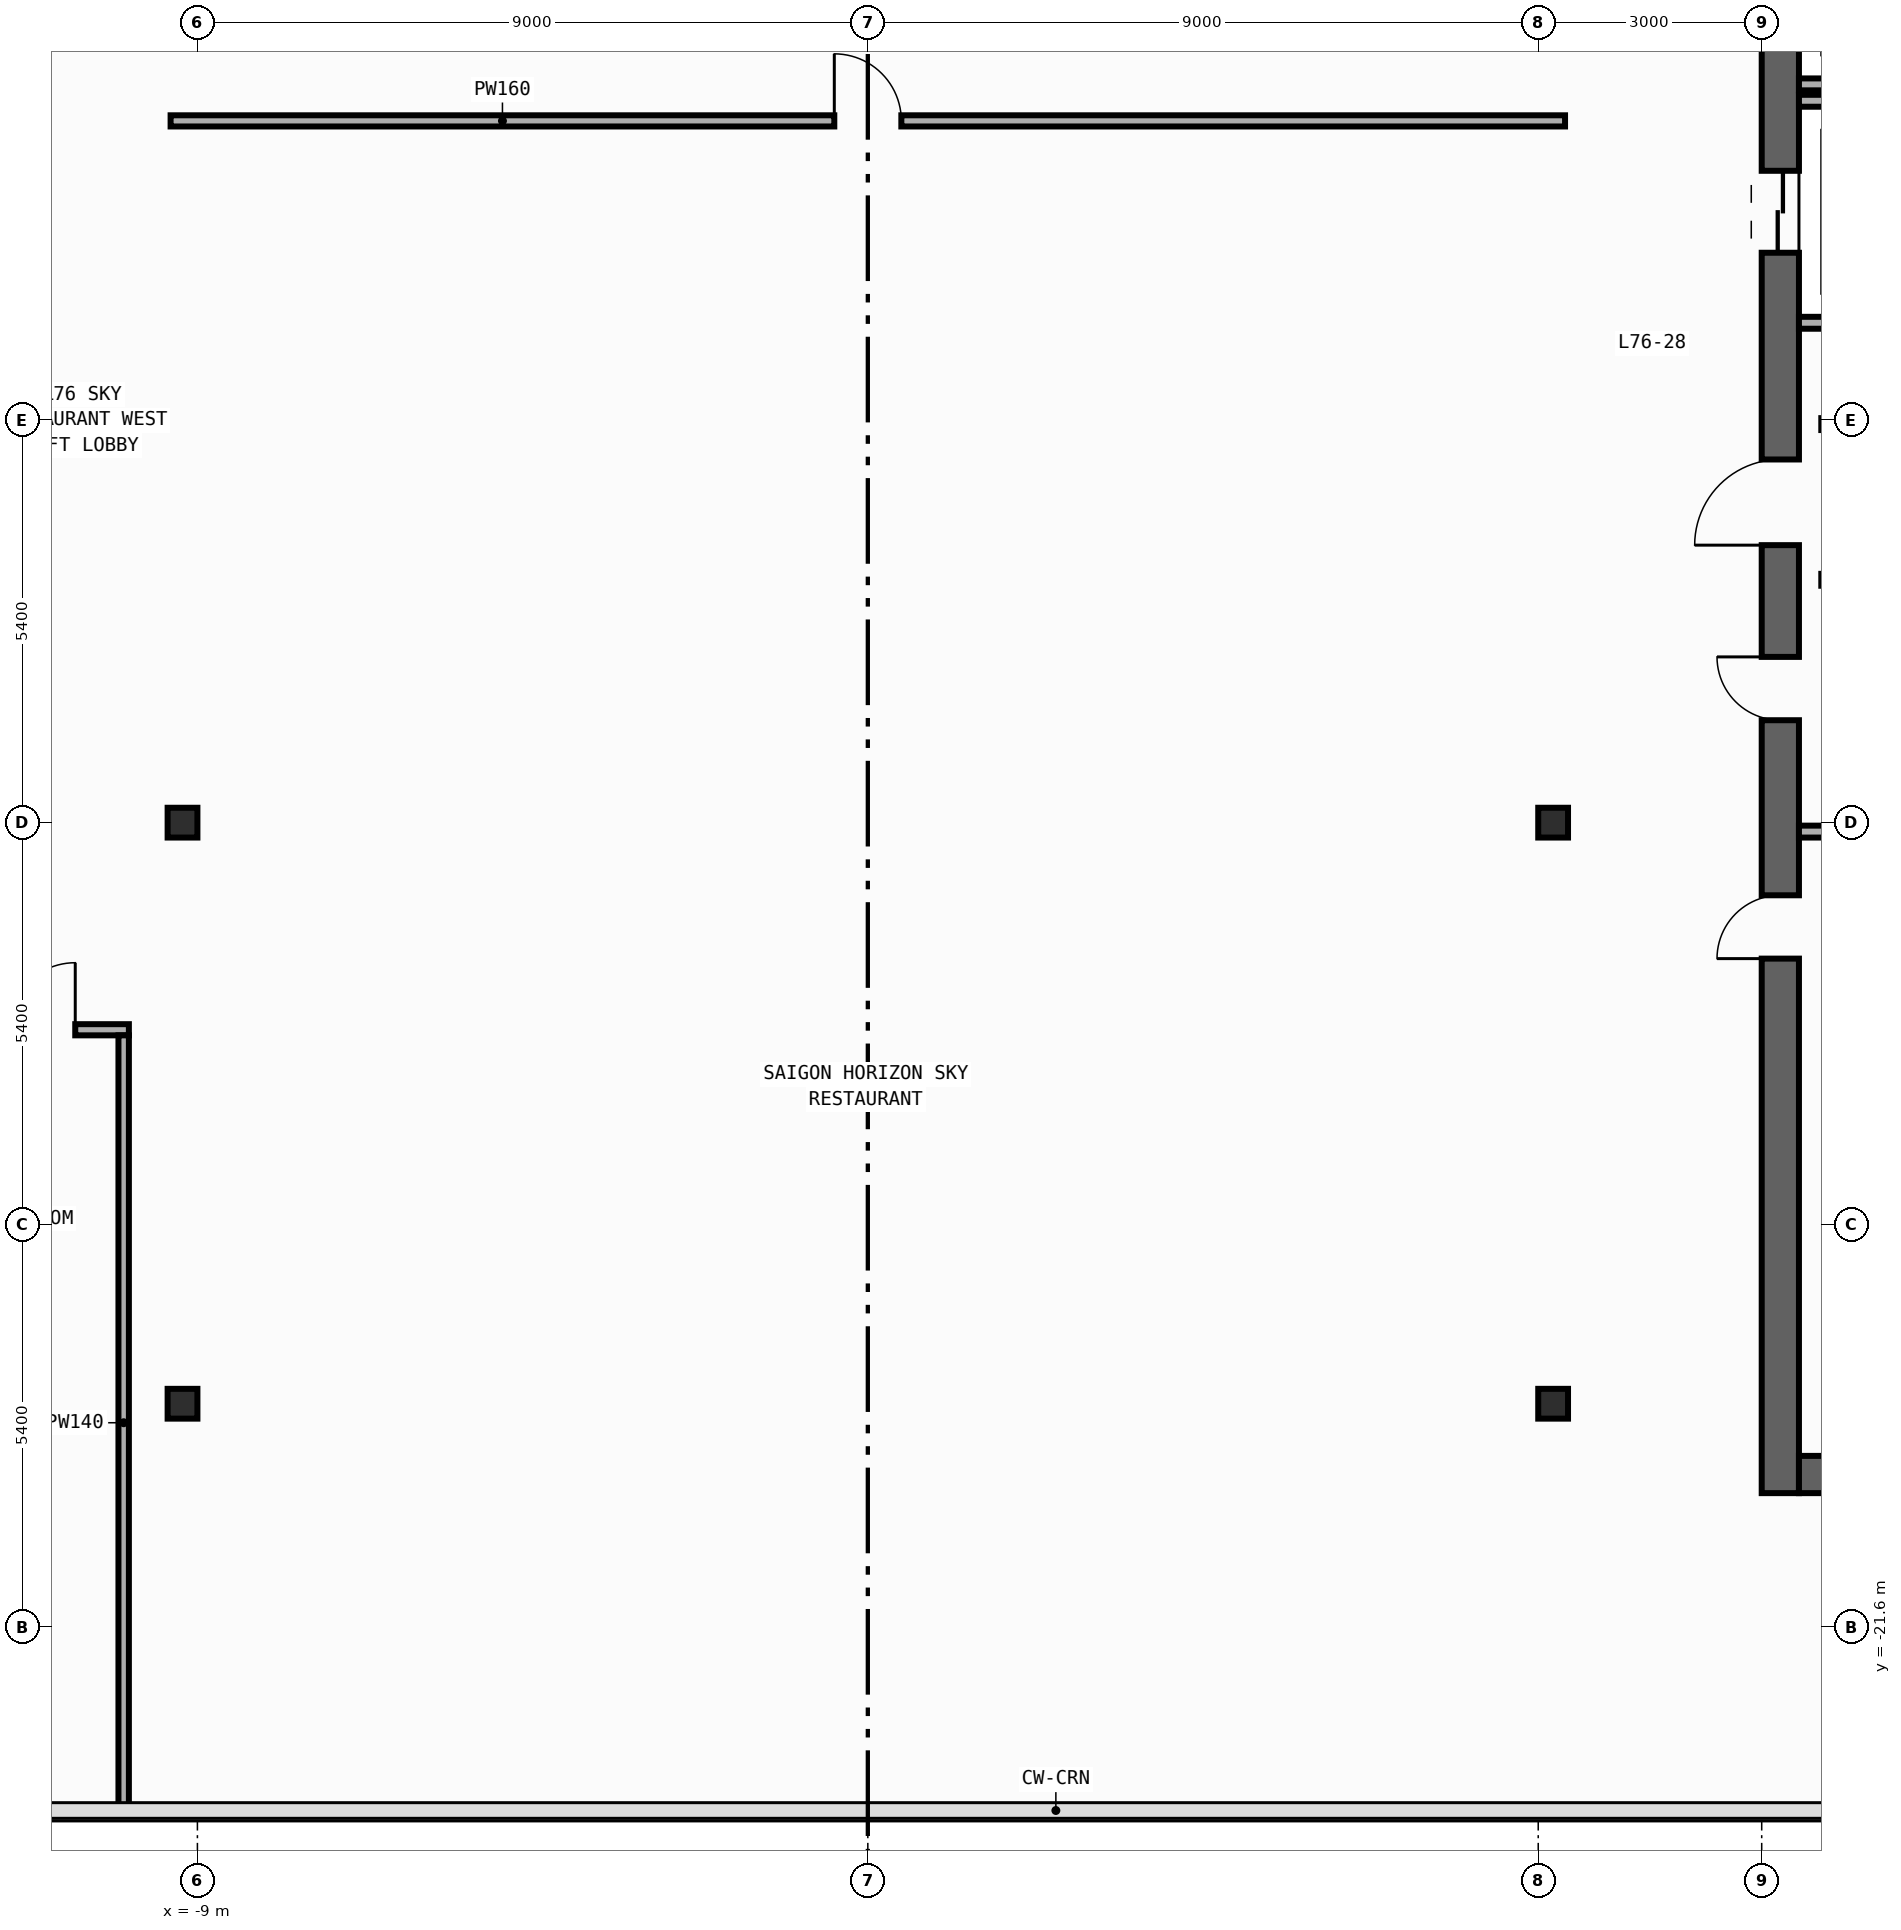
"""IFC4 building model, lengths in metres.
Left out: names, types, materials, properties, quantities, classifications, styles, units other than length and angle.
Written with IfcOpenShell. Run it as: python <this file> out.ifc"""

import sys

from ifc_helpers import new_model, si_unit, direction, frame, frame_2d, origin, origin_2d, place, context, subcontext, project, spatial, rectangle, i_section, extrude, element, fill, save


model = new_model("IFC4")
c1 = context("Model", 3, precision=1e-05, world=origin(), true_north=direction((0.0, 1.0)))
c2 = subcontext(c1, "Body", "Model", "MODEL_VIEW")
j1 = project(units=[si_unit("LENGTHUNIT", "METRE"), si_unit("PLANEANGLEUNIT", "RADIAN")], contexts=[c1])
p1 = place(None, origin())
s1 = spatial("IfcSite", under=j1, at=p1, CompositionType="ELEMENT")
p2 = place(p1, origin())
s2 = spatial("IfcBuilding", under=s1, at=p2, CompositionType="ELEMENT")
p3 = place(p2, frame((0.0, 0.0, 315.6)))
s3 = spatial("IfcBuildingStorey", under=s2, at=p3, CompositionType="ELEMENT", Elevation=315.6)
p4 = place(p3, frame((12.25, -19.8, 0.0), z_axis=(0.0, 0.0, 1.0), x_axis=(0.0, 1.0, 0.0)))
e1 = element("IfcWall", 1, at=p4, inside=s3, PredefinedType="SHEAR", context=c2, shape_type="SweptSolid", body=[
    extrude(rectangle(XDim=27.0, YDim=0.5, at=frame_2d((13.5, 0.0))), origin(), (0.0, 0.0, 1.0), 4.54),
])
p5 = place(p4, frame((23.05, 0.0, 0.0)))
e2 = element("IfcOpeningElement", 2, at=p5, cuts=e1, PredefinedType="OPENING", context=c2, shape_type="SweptSolid", body=[
    extrude(rectangle(XDim=1.1, YDim=2.2, at=frame_2d((0.55, 1.1))), frame((0.0, 0.26, 0.0), z_axis=(0.0, -1.0, 0.0), x_axis=(1.0, 0.0, 0.0)), (0.0, 0.0, 1.0), 0.52),
])
p6 = place(p4, frame((19.85, 0.0, 0.0)))
e3 = element("IfcOpeningElement", 3, at=p6, cuts=e1, PredefinedType="OPENING", context=c2, shape_type="SweptSolid", body=[
    extrude(rectangle(XDim=1.1, YDim=2.2, at=frame_2d((0.55, 1.1))), frame((0.0, 0.26, 0.0), z_axis=(0.0, -1.0, 0.0), x_axis=(1.0, 0.0, 0.0)), (0.0, 0.0, 1.0), 0.52),
])
p7 = place(p4, frame((16.65, 0.0, 0.0)))
e4 = element("IfcOpeningElement", 4, at=p7, cuts=e1, PredefinedType="OPENING", context=c2, shape_type="SweptSolid", body=[
    extrude(rectangle(XDim=1.1, YDim=2.2, at=frame_2d((0.55, 1.1))), frame((0.0, 0.26, 0.0), z_axis=(0.0, -1.0, 0.0), x_axis=(1.0, 0.0, 0.0)), (0.0, 0.0, 1.0), 0.52),
])
p8 = place(p4, frame((7.175, 0.0, 0.0)))
e5 = element("IfcOpeningElement", 5, at=p8, cuts=e1, PredefinedType="OPENING", context=c2, shape_type="SweptSolid", body=[
    extrude(rectangle(XDim=0.85, YDim=2.1, at=frame_2d((0.425, 1.05))), frame((0.0, 0.26, 0.0), z_axis=(0.0, -1.0, 0.0), x_axis=(1.0, 0.0, 0.0)), (0.0, 0.0, 1.0), 0.52),
])
p9 = place(p4, frame((10.375, 0.0, 0.0)))
e6 = element("IfcOpeningElement", 6, at=p9, cuts=e1, PredefinedType="OPENING", context=c2, shape_type="SweptSolid", body=[
    extrude(rectangle(XDim=0.85, YDim=2.1, at=frame_2d((0.425, 1.05))), frame((0.0, 0.26, 0.0), z_axis=(0.0, -1.0, 0.0), x_axis=(1.0, 0.0, 0.0)), (0.0, 0.0, 1.0), 0.52),
])
p10 = place(p4, frame((12.725, 0.0, 0.0)))
e7 = element("IfcOpeningElement", 7, at=p10, cuts=e1, PredefinedType="OPENING", context=c2, shape_type="SweptSolid", body=[
    extrude(rectangle(XDim=1.15, YDim=2.2, at=frame_2d((0.575, 1.1))), frame((0.0, 0.26, 0.0), z_axis=(0.0, -1.0, 0.0), x_axis=(1.0, 0.0, 0.0)), (0.0, 0.0, 1.0), 0.52),
])
p11 = place(p4, frame((25.125, 0.0, 0.0)))
e8 = element("IfcOpeningElement", 8, at=p11, cuts=e1, PredefinedType="OPENING", context=c2, shape_type="SweptSolid", body=[
    extrude(rectangle(XDim=0.85, YDim=2.1, at=frame_2d((0.425, 1.05))), frame((0.0, 0.26, 0.0), z_axis=(0.0, -1.0, 0.0), x_axis=(1.0, 0.0, 0.0)), (0.0, 0.0, 1.0), 0.52),
])
p12 = place(p3, frame((12.5, -19.55, 0.0), z_axis=(0.0, 0.0, 1.0), x_axis=(1.0, 0.0, 0.0)))
e9 = element("IfcWall", 9, at=p12, inside=s3, PredefinedType="SHEAR", context=c2, shape_type="SweptSolid", body=[
    extrude(rectangle(XDim=7.4, YDim=0.5, at=frame_2d((3.7, 0.0))), origin(), (0.0, 0.0, 1.0), 4.54),
])
for number, where, z_axis, x_axis in (
    (10, (-9.2, -18.6, 0.0), (0.0, 0.0, 1.0), (1.0, 0.0, 0.0)),
    (11, (-9.2, -10.8, 0.0), (0.0, 0.0, 1.0), (1.0, 0.0, 0.0)),
    (12, (9.2, -18.6, 0.0), (0.0, 0.0, 1.0), (1.0, 0.0, 0.0)),
    (13, (9.2, -10.8, 0.0), (0.0, 0.0, 1.0), (1.0, 0.0, 0.0)),
):
    element("IfcColumn", number, at=place(p3, frame(where, z_axis=z_axis, x_axis=x_axis)), inside=s3, PredefinedType="COLUMN", context=c2, shape_type="SweptSolid", body=[
        extrude(i_section(OverallWidth=0.4, OverallDepth=0.4, WebThickness=0.013, FlangeThickness=0.021, FilletRadius=0.022, at=origin_2d()), origin(), (0.0, 0.0, 1.0), 4.8),
    ])
for number, where, z_axis, x_axis in (
    (14, (12.5, -0.89, 0.0), (0.0, 0.0, 1.0), (1.0, 0.0, 0.0)),
    (15, (12.5, -4.09, 0.0), (0.0, 0.0, 1.0), (1.0, 0.0, 0.0)),
    (16, (12.5, -1.11, 0.0), (0.0, 0.0, 1.0), (1.0, 0.0, 0.0)),
):
    element("IfcWall", number, at=place(p3, frame(where, z_axis=z_axis, x_axis=x_axis)), inside=s3, PredefinedType="STANDARD", context=c2, shape_type="SweptSolid", body=[
        extrude(rectangle(XDim=2.49, YDim=0.16, at=frame_2d((1.245, 0.0))), origin(), (0.0, 0.0, 1.0), 4.54),
    ])
for number, where, z_axis, x_axis in (
    (17, (12.8, -5.45, 0.0), (0.0, 0.0, 1.0), (1.0, 0.0, 0.0)),
    (18, (12.8, -7.54, 0.0), (0.0, 0.0, 1.0), (1.0, 0.0, 0.0)),
):
    element("IfcWall", number, at=place(p3, frame(where, z_axis=z_axis, x_axis=x_axis)), inside=s3, PredefinedType="STANDARD", context=c2, shape_type="SweptSolid", body=[
        extrude(rectangle(XDim=2.6, YDim=0.16, at=frame_2d((1.3, 0.0))), origin(), (0.0, 0.0, 1.0), 4.54),
    ])
p13 = place(p3, frame((12.5, -10.92, 0.0), z_axis=(0.0, 0.0, 1.0), x_axis=(1.0, 0.0, 0.0)))
e19 = element("IfcWall", 19, at=p13, inside=s3, PredefinedType="PARTITIONING", context=c2, shape_type="SweptSolid", body=[
    extrude(rectangle(XDim=2.9, YDim=0.16, at=frame_2d((1.45, 0.0))), origin(), (0.0, 0.0, 1.0), 3.64),
])
p14 = place(p3, frame((-12.0, -13.58, 0.0), z_axis=(0.0, 0.0, 1.0), x_axis=(1.0, 0.0, 0.0)))
e20 = element("IfcWall", 20, at=p14, inside=s3, PredefinedType="PARTITIONING", context=c2, shape_type="SweptSolid", body=[
    extrude(rectangle(XDim=2.08, YDim=0.15, at=frame_2d((1.04, 0.0))), origin(), (0.0, 0.0, 1.0), 4.54),
])
p15 = place(p14, frame((0.46, 0.0, 0.0)))
e21 = element("IfcOpeningElement", 21, at=p15, cuts=e20, PredefinedType="OPENING", context=c2, shape_type="SweptSolid", body=[
    extrude(rectangle(XDim=0.9, YDim=2.15, at=frame_2d((0.45, 1.075))), frame((0.0, 0.085, 0.0), z_axis=(0.0, -1.0, 0.0), x_axis=(1.0, 0.0, 0.0)), (0.0, 0.0, 1.0), 0.17),
])
p16 = place(p3, frame((-9.36, -1.38, 0.0), z_axis=(0.0, 0.0, 1.0), x_axis=(1.0, 0.0, 0.0)))
e22 = element("IfcWall", 22, at=p16, inside=s3, PredefinedType="PARTITIONING", context=c2, shape_type="SweptSolid", body=[
    extrude(rectangle(XDim=18.72, YDim=0.15, at=frame_2d((9.36, 0.0))), origin(), (0.0, 0.0, 1.0), 4.54),
])
p17 = place(p16, frame((8.91, 0.0, 0.0)))
e23 = element("IfcOpeningElement", 23, at=p17, cuts=e22, PredefinedType="OPENING", context=c2, shape_type="SweptSolid", body=[
    extrude(rectangle(XDim=0.9, YDim=2.15, at=frame_2d((0.45, 1.075))), frame((0.0, 0.085, 0.0), z_axis=(0.0, -1.0, 0.0), x_axis=(1.0, 0.0, 0.0)), (0.0, 0.0, 1.0), 0.17),
])
p18 = place(p3, frame((-9.99, -24.055, 0.0), z_axis=(0.0, 0.0, 1.0), x_axis=(0.0, 1.0, 0.0)))
e24 = element("IfcWall", 24, at=p18, inside=s3, PredefinedType="PARTITIONING", context=c2, shape_type="SweptSolid", body=[
    extrude(rectangle(XDim=10.4, YDim=0.14, at=frame_2d((5.2, 0.0))), origin(), (0.0, 0.0, 1.0), 4.54),
])
p19 = place(p7, origin())
e25 = element("IfcDoor", 25, at=p19, inside=s3, OperationType="DOUBLE_DOOR_SLIDING", PredefinedType="DOOR", context=c2, shape_type="SweptSolid", body=[
    extrude(rectangle(XDim=1.1, YDim=2.2, at=frame_2d((0.55, 1.1))), frame((0.0, 0.025, 0.0), z_axis=(0.0, -1.0, 0.0), x_axis=(1.0, 0.0, 0.0)), (0.0, 0.0, 1.0), 0.05),
])
fill(e4, e25)
p20 = place(p8, origin())
e26 = element("IfcDoor", 26, at=p20, inside=s3, OperationType="SINGLE_SWING_LEFT", PredefinedType="DOOR", context=c2, shape_type="SweptSolid", body=[
    extrude(rectangle(XDim=0.85, YDim=2.1, at=frame_2d((0.425, 1.05))), frame((0.0, 0.025, 0.0), z_axis=(0.0, -1.0, 0.0), x_axis=(1.0, 0.0, 0.0)), (0.0, 0.0, 1.0), 0.05),
])
fill(e5, e26)
p21 = place(p9, origin())
e27 = element("IfcDoor", 27, at=p21, inside=s3, OperationType="SINGLE_SWING_RIGHT", PredefinedType="DOOR", context=c2, shape_type="SweptSolid", body=[
    extrude(rectangle(XDim=0.85, YDim=2.1, at=frame_2d((0.425, 1.05))), frame((0.0, 0.025, 0.0), z_axis=(0.0, -1.0, 0.0), x_axis=(1.0, 0.0, 0.0)), (0.0, 0.0, 1.0), 0.05),
])
fill(e6, e27)
p22 = place(p10, origin())
e28 = element("IfcDoor", 28, at=p22, inside=s3, OperationType="SINGLE_SWING_LEFT", PredefinedType="DOOR", context=c2, shape_type="SweptSolid", body=[
    extrude(rectangle(XDim=1.15, YDim=2.2, at=frame_2d((0.575, 1.1))), frame((0.0, 0.025, 0.0), z_axis=(0.0, -1.0, 0.0), x_axis=(1.0, 0.0, 0.0)), (0.0, 0.0, 1.0), 0.05),
])
fill(e7, e28)
p23 = place(p15, origin())
e29 = element("IfcDoor", 29, at=p23, inside=s3, OperationType="SINGLE_SWING_RIGHT", PredefinedType="DOOR", context=c2, shape_type="SweptSolid", body=[
    extrude(rectangle(XDim=0.9, YDim=2.15, at=frame_2d((0.45, 1.075))), frame((0.0, 0.025, 0.0), z_axis=(0.0, -1.0, 0.0), x_axis=(1.0, 0.0, 0.0)), (0.0, 0.0, 1.0), 0.05),
])
fill(e21, e29)
p24 = place(p17, origin())
e30 = element("IfcDoor", 30, at=p24, inside=s3, OperationType="SINGLE_SWING_LEFT", PredefinedType="DOOR", context=c2, shape_type="SweptSolid", body=[
    extrude(rectangle(XDim=0.9, YDim=2.15, at=frame_2d((0.45, 1.075))), frame((0.0, 0.025, 0.0), z_axis=(0.0, -1.0, 0.0), x_axis=(1.0, 0.0, 0.0)), (0.0, 0.0, 1.0), 0.05),
])
fill(e23, e30)
save(model, sys.argv[1])
